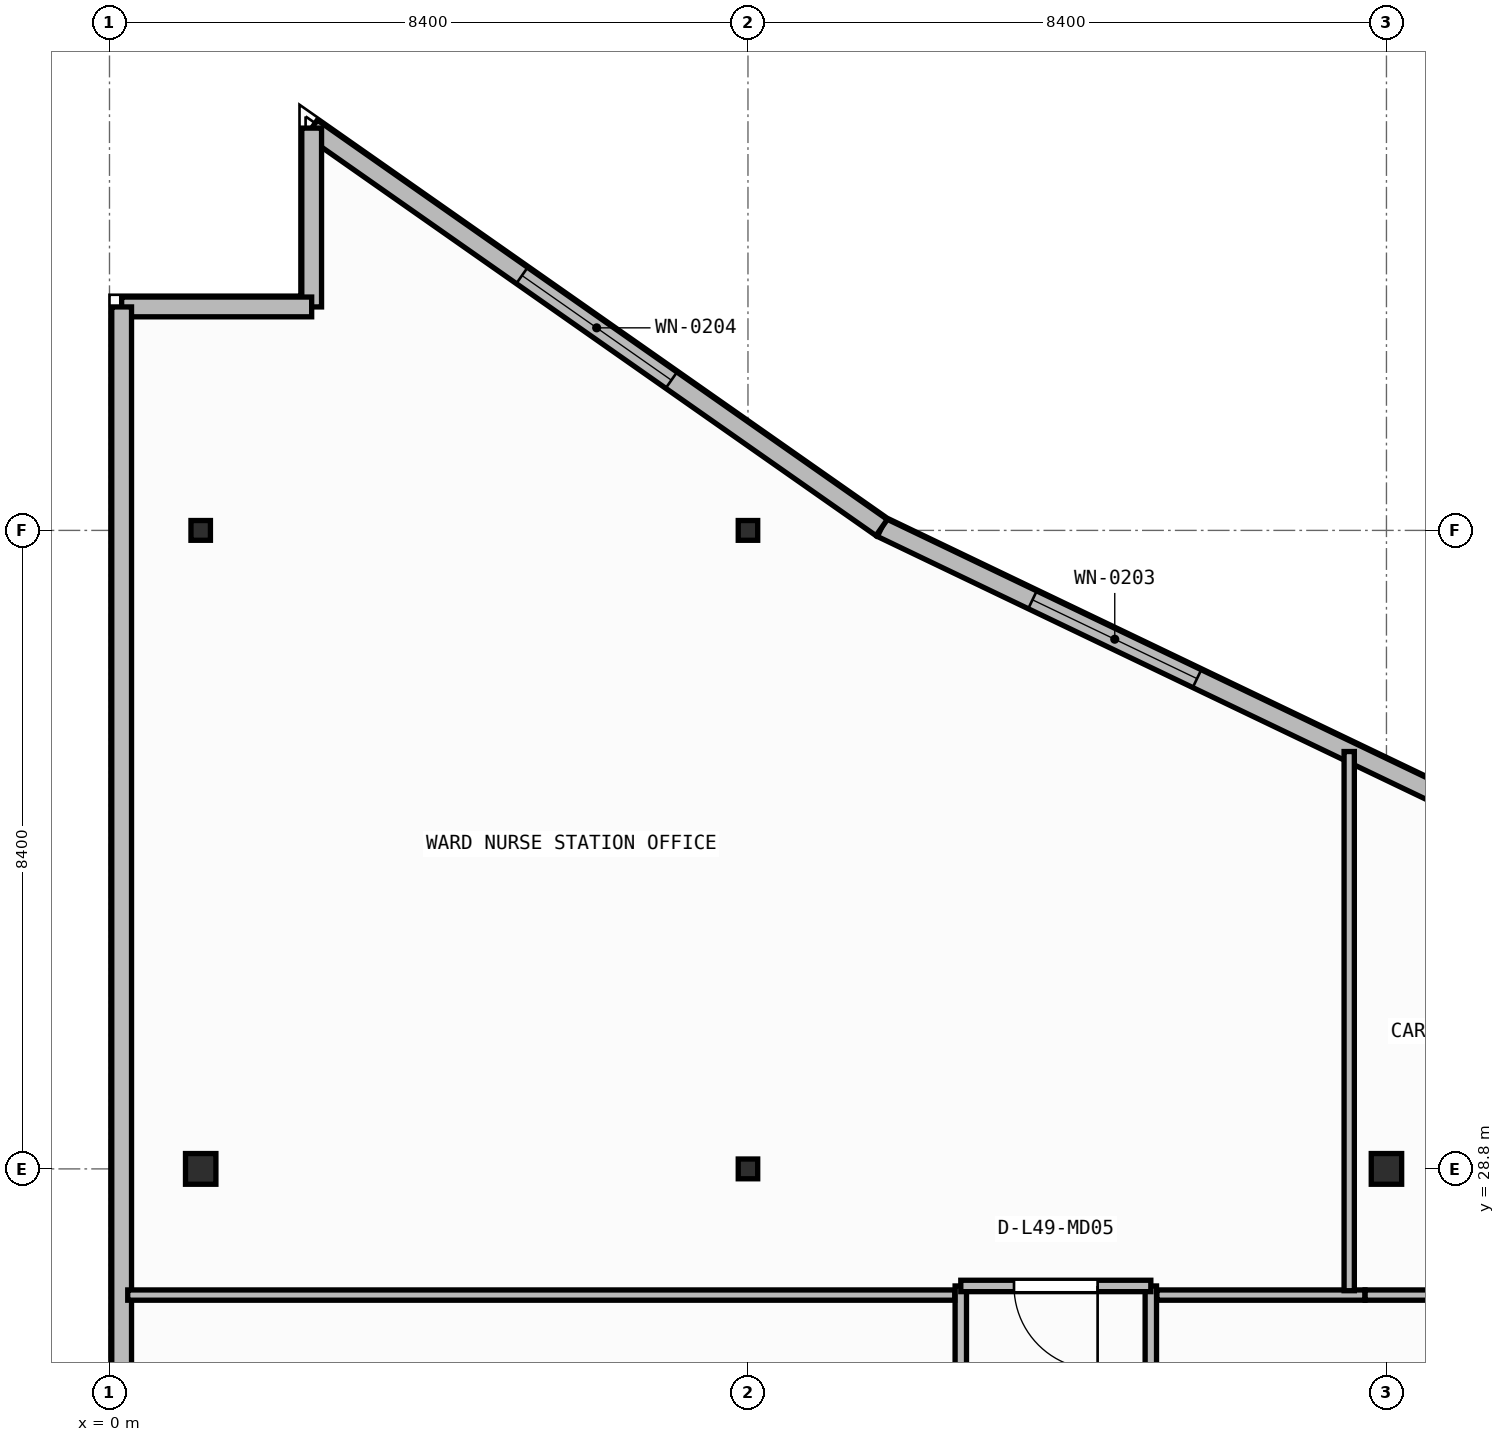
"""IFC4 building model, lengths in metres.
Left out: names, types, materials, properties, quantities, classifications, styles, units other than length and angle.
Written with IfcOpenShell. Run it as: python <this file> out.ifc"""

import sys

from ifc_helpers import new_model, si_unit, direction, frame, frame_2d, origin, origin_2d, place, context, subcontext, project, spatial, rectangle, i_section, extrude, element, fill, save


model = new_model("IFC4")
c1 = context("Model", 3, precision=1e-05, world=origin(), true_north=direction((0.0, 1.0)))
c2 = subcontext(c1, "Body", "Model", "MODEL_VIEW")
j1 = project(units=[si_unit("LENGTHUNIT", "METRE"), si_unit("PLANEANGLEUNIT", "RADIAN")], contexts=[c1])
p1 = place(None, origin())
s1 = spatial("IfcSite", under=j1, at=p1, CompositionType="ELEMENT")
p2 = place(p1, origin())
s2 = spatial("IfcBuilding", under=s1, at=p2, CompositionType="ELEMENT")
p3 = place(p2, frame((0.0, 0.0, 200.0)))
s3 = spatial("IfcBuildingStorey", under=s2, at=p3, CompositionType="ELEMENT", Elevation=200.0)
p4 = place(p3, frame((1.2, 28.8, 0.0), z_axis=(0.0, 0.0, 1.0), x_axis=(1.0, 0.0, 0.0)))
e1 = element("IfcColumn", 1, at=p4, inside=s3, PredefinedType="COLUMN", context=c2, shape_type="SweptSolid", body=[
    extrude(i_section(OverallWidth=0.4, OverallDepth=0.404, WebThickness=0.02, FlangeThickness=0.032, at=origin_2d()), origin(), (0.0, 0.0, 1.0), 3.95),
])
p5 = place(p3, frame((8.4, 28.8, 0.0), z_axis=(0.0, 0.0, 1.0), x_axis=(1.0, 0.0, 0.0)))
e2 = element("IfcColumn", 2, at=p5, inside=s3, PredefinedType="COLUMN", context=c2, shape_type="SweptSolid", body=[
    extrude(i_section(OverallWidth=0.256, OverallDepth=0.26, WebThickness=0.01, FlangeThickness=0.017, FilletRadius=0.013, at=origin_2d()), origin(), (0.0, 0.0, 1.0), 3.95),
])
p6 = place(p3, frame((16.8, 28.8, 0.0), z_axis=(0.0, 0.0, 1.0), x_axis=(1.0, 0.0, 0.0)))
e3 = element("IfcColumn", 3, at=p6, inside=s3, PredefinedType="COLUMN", context=c2, shape_type="SweptSolid", body=[
    extrude(i_section(OverallWidth=0.4, OverallDepth=0.404, WebThickness=0.02, FlangeThickness=0.032, at=origin_2d()), origin(), (0.0, 0.0, 1.0), 3.95),
])
for number, where, z_axis, x_axis in (
    (4, (1.2, 37.2, 0.0), (0.0, 0.0, 1.0), (1.0, 0.0, 0.0)),
    (5, (8.4, 37.2, 0.0), (0.0, 0.0, 1.0), (1.0, 0.0, 0.0)),
):
    element("IfcColumn", number, at=place(p3, frame(where, z_axis=z_axis, x_axis=x_axis)), inside=s3, PredefinedType="COLUMN", context=c2, shape_type="SweptSolid", body=[
        extrude(i_section(OverallWidth=0.256, OverallDepth=0.26, WebThickness=0.01, FlangeThickness=0.017, FilletRadius=0.013, at=origin_2d()), origin(), (0.0, 0.0, 1.0), 3.95),
    ])
p7 = place(p3, frame((21.461, 31.823, 0.0), z_axis=(0.0, 0.0, 1.0), x_axis=(-0.901858094827, 0.432032379336, 0.0)))
e6 = element("IfcWall", 6, at=p7, inside=s3, PredefinedType="STANDARD", context=c2, shape_type="SweptSolid", body=[
    extrude(rectangle(XDim=12.532, YDim=0.26, at=frame_2d((6.266, 0.0))), origin(), (0.0, 0.0, 1.0), 3.71),
])
p8 = place(p7, frame((7.932, 0.0, 0.9)))
e7 = element("IfcOpeningElement", 7, at=p8, cuts=e6, PredefinedType="OPENING", context=c2, shape_type="SweptSolid", body=[
    extrude(rectangle(XDim=2.4, YDim=1.65, at=frame_2d((1.2, 0.825))), frame((0.0, 0.14, 0.0), z_axis=(0.0, -1.0, 0.0), x_axis=(1.0, 0.0, 0.0)), (0.0, 0.0, 1.0), 0.28),
])
p9 = place(p3, frame((10.159, 37.237, 0.0), z_axis=(0.0, 0.0, 1.0), x_axis=(-0.818933702389, 0.57388813465, 0.0)))
e8 = element("IfcWall", 8, at=p9, inside=s3, PredefinedType="STANDARD", context=c2, shape_type="SweptSolid", body=[
    extrude(rectangle(XDim=9.157, YDim=0.26, at=frame_2d((4.579, 0.0))), origin(), (0.0, 0.0, 1.0), 3.71),
])
p10 = place(p9, frame((3.378, 0.0, 0.9)))
e9 = element("IfcOpeningElement", 9, at=p10, cuts=e8, PredefinedType="OPENING", context=c2, shape_type="SweptSolid", body=[
    extrude(rectangle(XDim=2.4, YDim=1.65, at=frame_2d((1.2, 0.825))), frame((0.0, 0.14, 0.0), z_axis=(0.0, -1.0, 0.0), x_axis=(1.0, 0.0, 0.0)), (0.0, 0.0, 1.0), 0.28),
])
p11 = place(p3, frame((2.66, 42.492, 0.0), z_axis=(0.0, 0.0, 1.0), x_axis=(0.0, -1.0, 0.0)))
e10 = element("IfcWall", 10, at=p11, inside=s3, PredefinedType="STANDARD", context=c2, shape_type="SweptSolid", body=[
    extrude(rectangle(XDim=2.353, YDim=0.26, at=frame_2d((1.176, 0.0))), origin(), (0.0, 0.0, 1.0), 3.71),
])
p12 = place(p3, frame((2.66, 40.14, 0.0), z_axis=(0.0, 0.0, 1.0), x_axis=(-1.0, 0.0, 0.0)))
e11 = element("IfcWall", 11, at=p12, inside=s3, PredefinedType="STANDARD", context=c2, shape_type="SweptSolid", body=[
    extrude(rectangle(XDim=2.5, YDim=0.26, at=frame_2d((1.25, 0.0))), origin(), (0.0, 0.0, 1.0), 3.71),
])
p13 = place(p3, frame((0.16, 40.14, 0.0), z_axis=(0.0, 0.0, 1.0), x_axis=(0.0, -1.0, 0.0)))
e12 = element("IfcWall", 12, at=p13, inside=s3, PredefinedType="STANDARD", context=c2, shape_type="SweptSolid", body=[
    extrude(rectangle(XDim=37.48, YDim=0.26, at=frame_2d((18.74, 0.0))), origin(), (0.0, 0.0, 1.0), 3.71),
])
p14 = place(p13, frame((27.4, 0.0, 0.9)))
e13 = element("IfcOpeningElement", 13, at=p14, cuts=e12, PredefinedType="OPENING", context=c2, shape_type="SweptSolid", body=[
    extrude(rectangle(XDim=2.4, YDim=1.65, at=frame_2d((1.2, 0.825))), frame((0.0, 0.14, 0.0), z_axis=(0.0, -1.0, 0.0), x_axis=(1.0, 0.0, 0.0)), (0.0, 0.0, 1.0), 0.28),
])
p15 = place(p3, frame((11.2, 27.26, 0.0), z_axis=(0.0, 0.0, 1.0), x_axis=(0.0, -1.0, 0.0)))
e14 = element("IfcWall", 14, at=p15, inside=s3, PredefinedType="PARTITIONING", context=c2, shape_type="SweptSolid", body=[
    extrude(rectangle(XDim=6.592, YDim=0.15, at=frame_2d((3.296, 0.0))), origin(), (0.0, 0.0, 1.0), 3.71),
])
p16 = place(p15, frame((2.746, 0.0, 0.0)))
e15 = element("IfcOpeningElement", 15, at=p16, cuts=e14, PredefinedType="OPENING", context=c2, shape_type="SweptSolid", body=[
    extrude(rectangle(XDim=1.1, YDim=2.1, at=frame_2d((0.55, 1.05))), frame((0.0, 0.085, 0.0), z_axis=(0.0, -1.0, 0.0), x_axis=(1.0, 0.0, 0.0)), (0.0, 0.0, 1.0), 0.17),
])
p17 = place(p3, frame((13.7, 20.668, 0.0), z_axis=(0.0, 0.0, 1.0), x_axis=(0.0, 1.0, 0.0)))
e16 = element("IfcWall", 16, at=p17, inside=s3, PredefinedType="PARTITIONING", context=c2, shape_type="SweptSolid", body=[
    extrude(rectangle(XDim=6.592, YDim=0.15, at=frame_2d((3.296, 0.0))), origin(), (0.0, 0.0, 1.0), 3.71),
])
p18 = place(p17, frame((2.746, 0.0, 0.0)))
e17 = element("IfcOpeningElement", 17, at=p18, cuts=e16, PredefinedType="OPENING", context=c2, shape_type="SweptSolid", body=[
    extrude(rectangle(XDim=1.1, YDim=2.1, at=frame_2d((0.55, 1.05))), frame((0.0, 0.085, 0.0), z_axis=(0.0, -1.0, 0.0), x_axis=(1.0, 0.0, 0.0)), (0.0, 0.0, 1.0), 0.17),
])
p19 = place(p3, frame((13.7, 27.26, 0.0), z_axis=(0.0, 0.0, 1.0), x_axis=(-1.0, 0.0, 0.0)))
e18 = element("IfcWall", 18, at=p19, inside=s3, PredefinedType="PARTITIONING", context=c2, shape_type="SweptSolid", body=[
    extrude(rectangle(XDim=2.5, YDim=0.15, at=frame_2d((1.25, 0.0))), origin(), (0.0, 0.0, 1.0), 3.71),
])
p20 = place(p19, frame((0.7, 0.0, 0.0)))
e19 = element("IfcOpeningElement", 19, at=p20, cuts=e18, PredefinedType="OPENING", context=c2, shape_type="SweptSolid", body=[
    extrude(rectangle(XDim=1.1, YDim=2.1, at=frame_2d((0.55, 1.05))), frame((0.0, 0.085, 0.0), z_axis=(0.0, -1.0, 0.0), x_axis=(1.0, 0.0, 0.0)), (0.0, 0.0, 1.0), 0.17),
])
p21 = place(p3, frame((11.12, 27.14, 0.0), z_axis=(0.0, 0.0, 1.0), x_axis=(-1.0, 0.0, 0.0)))
e20 = element("IfcWall", 20, at=p21, inside=s3, PredefinedType="PARTITIONING", context=c2, shape_type="SweptSolid", body=[
    extrude(rectangle(XDim=10.88, YDim=0.135, at=frame_2d((5.44, 0.0))), origin(), (0.0, 0.0, 1.0), 3.71),
])
p22 = place(p3, frame((16.518, 27.14, 0.0), z_axis=(0.0, 0.0, 1.0), x_axis=(-1.0, 0.0, 0.0)))
e21 = element("IfcWall", 21, at=p22, inside=s3, PredefinedType="PARTITIONING", context=c2, shape_type="SweptSolid", body=[
    extrude(rectangle(XDim=2.738, YDim=0.135, at=frame_2d((1.369, 0.0))), origin(), (0.0, 0.0, 1.0), 3.71),
])
p23 = place(p3, frame((36.2, 27.14, 0.0), z_axis=(0.0, 0.0, 1.0), x_axis=(-1.0, 0.0, 0.0)))
e22 = element("IfcWall", 22, at=p23, inside=s3, PredefinedType="PARTITIONING", context=c2, shape_type="SweptSolid", body=[
    extrude(rectangle(XDim=19.68, YDim=0.135, at=frame_2d((9.84, 0.0))), origin(), (0.0, 0.0, 1.0), 3.71),
])
p24 = place(p23, frame((14.744, 0.0, 0.0)))
e23 = element("IfcOpeningElement", 23, at=p24, cuts=e22, PredefinedType="OPENING", context=c2, shape_type="SweptSolid", body=[
    extrude(rectangle(XDim=1.1, YDim=2.1, at=frame_2d((0.55, 1.05))), frame((0.0, 0.077, 0.0), z_axis=(0.0, -1.0, 0.0), x_axis=(1.0, 0.0, 0.0)), (0.0, 0.0, 1.0), 0.155),
])
p25 = place(p3, frame((16.31, 27.198, 0.0), z_axis=(0.0, 0.0, 1.0), x_axis=(0.0, 1.0, 0.0)))
e24 = element("IfcWall", 24, at=p25, inside=s3, PredefinedType="PARTITIONING", context=c2, shape_type="SweptSolid", body=[
    extrude(rectangle(XDim=7.093, YDim=0.135, at=frame_2d((3.547, 0.0))), origin(), (0.0, 0.0, 1.0), 3.157),
])
p26 = place(p8, origin())
e25 = element("IfcWindow", 25, at=p26, inside=s3, PartitioningType="SINGLE_PANEL", PredefinedType="WINDOW", context=c2, shape_type="SweptSolid", body=[
    extrude(rectangle(XDim=2.4, YDim=1.65, at=frame_2d((1.2, 0.825))), frame((0.0, 0.03, 0.0), z_axis=(0.0, -1.0, 0.0), x_axis=(1.0, 0.0, 0.0)), (0.0, 0.0, 1.0), 0.06),
])
fill(e7, e25)
p27 = place(p10, origin())
e26 = element("IfcWindow", 26, at=p27, inside=s3, PartitioningType="SINGLE_PANEL", PredefinedType="WINDOW", context=c2, shape_type="SweptSolid", body=[
    extrude(rectangle(XDim=2.4, YDim=1.65, at=frame_2d((1.2, 0.825))), frame((0.0, 0.03, 0.0), z_axis=(0.0, -1.0, 0.0), x_axis=(1.0, 0.0, 0.0)), (0.0, 0.0, 1.0), 0.06),
])
fill(e9, e26)
p28 = place(p20, origin())
e27 = element("IfcDoor", 27, at=p28, inside=s3, OperationType="SINGLE_SWING_LEFT", PredefinedType="DOOR", context=c2, shape_type="SweptSolid", body=[
    extrude(rectangle(XDim=1.1, YDim=2.1, at=frame_2d((0.55, 1.05))), frame((0.0, 0.025, 0.0), z_axis=(0.0, -1.0, 0.0), x_axis=(1.0, 0.0, 0.0)), (0.0, 0.0, 1.0), 0.05),
])
fill(e19, e27)
save(model, sys.argv[1])
